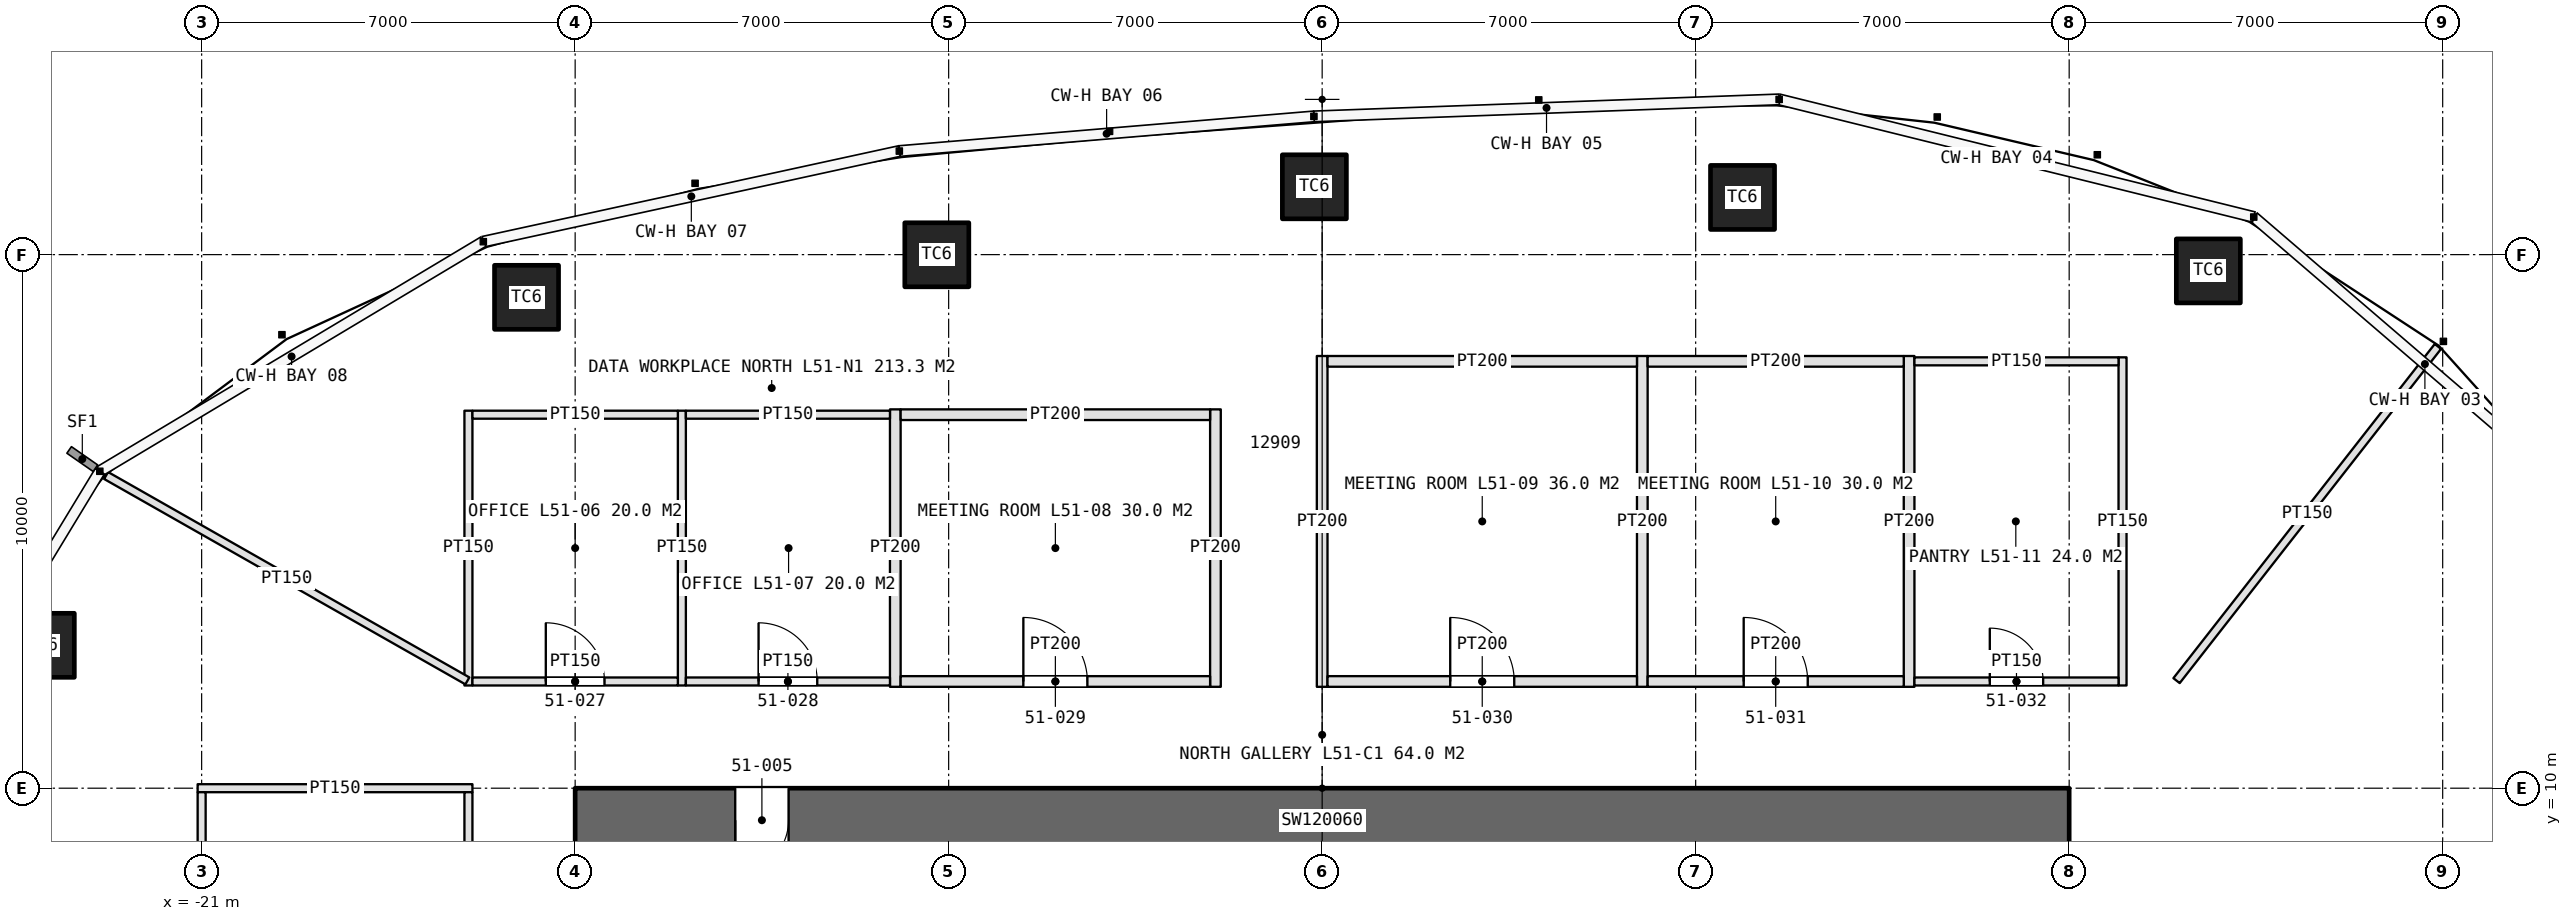
"""IFC4 building model, lengths in metres.
Left out: names, types, materials, properties, quantities, classifications, styles, units other than length and angle.
Written with IfcOpenShell. Run it as: python <this file> out.ifc"""

import sys

from ifc_helpers import new_model, si_unit, direction, frame, frame_2d, origin, origin_2d, place, context, subcontext, project, spatial, rectangle, extrude, element, fill, save


model = new_model("IFC4")
c1 = context("Model", 3, precision=1e-05, world=origin(), true_north=direction((0.0, 1.0)))
c2 = subcontext(c1, "Body", "Model", "MODEL_VIEW")
j1 = project(units=[si_unit("LENGTHUNIT", "METRE"), si_unit("PLANEANGLEUNIT", "RADIAN")], contexts=[c1])
p1 = place(None, origin())
s1 = spatial("IfcSite", under=j1, at=p1, CompositionType="ELEMENT")
p2 = place(p1, origin())
s2 = spatial("IfcBuilding", under=s1, at=p2, CompositionType="ELEMENT")
p3 = place(p2, frame((0.0, 0.0, 232.6)))
s3 = spatial("IfcBuildingStorey", under=s2, at=p3, CompositionType="ELEMENT", Elevation=232.6)
p4 = place(p3, frame((14.0, 9.4, 0.0), z_axis=(0.0, 0.0, 1.0), x_axis=(-1.0, 0.0, 0.0)))
e1 = element("IfcWall", 1, at=p4, inside=s3, PredefinedType="SHEAR", context=c2, shape_type="SweptSolid", body=[
    extrude(rectangle(XDim=28.0, YDim=1.2, at=frame_2d((14.0, 0.0))), origin(), (0.0, 0.0, 1.0), 4.2),
])
p5 = place(p4, frame((24.0, 0.0, 0.0)))
e2 = element("IfcOpeningElement", 2, at=p5, cuts=e1, PredefinedType="OPENING", context=c2, shape_type="SweptSolid", body=[
    extrude(rectangle(XDim=1.0, YDim=2.4, at=frame_2d((0.5, 1.2))), frame((0.0, 0.61, 0.0), z_axis=(0.0, -1.0, 0.0), x_axis=(1.0, 0.0, 0.0)), (0.0, 0.0, 1.0), 1.22),
])
for number, where, z_axis, x_axis in (
    (3, (16.608, 19.695, 0.0), (0.0, 0.0, 1.0), (1.0, 0.0, 0.0)),
    (4, (7.878, 21.072, 0.0), (0.0, 0.0, 1.0), (1.0, 0.0, 0.0)),
    (5, (-0.146, 21.271, 0.0), (0.0, 0.0, 1.0), (1.0, 0.0, 0.0)),
    (6, (-7.222, 19.997, 0.0), (0.0, 0.0, 1.0), (1.0, 0.0, 0.0)),
    (7, (-14.911, 19.2, 0.0), (0.0, 0.0, 1.0), (1.0, 0.0, 0.0)),
    (8, (-23.986, 12.678, 0.0), (0.0, 0.0, 1.0), (1.0, 0.0, 0.0)),
):
    element("IfcColumn", number, at=place(p3, frame(where, z_axis=z_axis, x_axis=x_axis)), inside=s3, PredefinedType="COLUMN", context=c2, shape_type="SweptSolid", body=[
        extrude(rectangle(XDim=1.2, YDim=1.2, at=origin_2d()), origin(), (0.0, 0.0, 1.0), 4.2),
    ])
for number, where, z_axis, x_axis in (
    (9, (-16.0, 11.925, 0.0), (0.0, 0.0, 1.0), (0.0, 1.0, 0.0)),
    (10, (-12.0, 11.925, 0.0), (0.0, 0.0, 1.0), (0.0, 1.0, 0.0)),
):
    element("IfcWall", number, at=place(p3, frame(where, z_axis=z_axis, x_axis=x_axis)), inside=s3, PredefinedType="PARTITIONING", context=c2, shape_type="SweptSolid", body=[
        extrude(rectangle(XDim=5.15, YDim=0.15, at=frame_2d((2.575, 0.0))), origin(), (0.0, 0.0, 1.0), 3.0),
    ])
for number, where, z_axis, x_axis in (
    (11, (-8.0, 11.9, 0.0), (0.0, 0.0, 1.0), (0.0, 1.0, 0.0)),
    (12, (-2.0, 11.9, 0.0), (0.0, 0.0, 1.0), (0.0, 1.0, 0.0)),
):
    element("IfcWall", number, at=place(p3, frame(where, z_axis=z_axis, x_axis=x_axis)), inside=s3, PredefinedType="PARTITIONING", context=c2, shape_type="SweptSolid", body=[
        extrude(rectangle(XDim=5.2, YDim=0.2, at=frame_2d((2.6, 0.0))), origin(), (0.0, 0.0, 1.0), 3.0),
    ])
p6 = place(p3, frame((-15.925, 12.0, 0.0), z_axis=(0.0, 0.0, 1.0), x_axis=(1.0, 0.0, 0.0)))
e13 = element("IfcWall", 13, at=p6, inside=s3, PredefinedType="PARTITIONING", context=c2, shape_type="SweptSolid", body=[
    extrude(rectangle(XDim=3.85, YDim=0.15, at=frame_2d((1.925, 0.0))), origin(), (0.0, 0.0, 1.0), 3.0),
])
p7 = place(p6, frame((1.375, 0.0, 0.0)))
e14 = element("IfcOpeningElement", 14, at=p7, cuts=e13, PredefinedType="OPENING", context=c2, shape_type="SweptSolid", body=[
    extrude(rectangle(XDim=1.1, YDim=2.3, at=frame_2d((0.55, 1.15))), frame((0.0, 0.085, 0.0), z_axis=(0.0, -1.0, 0.0), x_axis=(1.0, 0.0, 0.0)), (0.0, 0.0, 1.0), 0.17),
])
p8 = place(p3, frame((-15.925, 17.0, 0.0), z_axis=(0.0, 0.0, 1.0), x_axis=(1.0, 0.0, 0.0)))
e15 = element("IfcWall", 15, at=p8, inside=s3, PredefinedType="PARTITIONING", context=c2, shape_type="SweptSolid", body=[
    extrude(rectangle(XDim=3.85, YDim=0.15, at=frame_2d((1.925, 0.0))), origin(), (0.0, 0.0, 1.0), 3.0),
])
p9 = place(p3, frame((-11.925, 12.0, 0.0), z_axis=(0.0, 0.0, 1.0), x_axis=(1.0, 0.0, 0.0)))
e16 = element("IfcWall", 16, at=p9, inside=s3, PredefinedType="PARTITIONING", context=c2, shape_type="SweptSolid", body=[
    extrude(rectangle(XDim=3.825, YDim=0.15, at=frame_2d((1.913, 0.0))), origin(), (0.0, 0.0, 1.0), 3.0),
])
p10 = place(p9, frame((1.363, 0.0, 0.0)))
e17 = element("IfcOpeningElement", 17, at=p10, cuts=e16, PredefinedType="OPENING", context=c2, shape_type="SweptSolid", body=[
    extrude(rectangle(XDim=1.1, YDim=2.3, at=frame_2d((0.55, 1.15))), frame((0.0, 0.085, 0.0), z_axis=(0.0, -1.0, 0.0), x_axis=(1.0, 0.0, 0.0)), (0.0, 0.0, 1.0), 0.17),
])
p11 = place(p3, frame((-11.925, 17.0, 0.0), z_axis=(0.0, 0.0, 1.0), x_axis=(1.0, 0.0, 0.0)))
e18 = element("IfcWall", 18, at=p11, inside=s3, PredefinedType="PARTITIONING", context=c2, shape_type="SweptSolid", body=[
    extrude(rectangle(XDim=3.825, YDim=0.15, at=frame_2d((1.913, 0.0))), origin(), (0.0, 0.0, 1.0), 3.0),
])
p12 = place(p3, frame((-7.9, 12.0, 0.0), z_axis=(0.0, 0.0, 1.0), x_axis=(1.0, 0.0, 0.0)))
e19 = element("IfcWall", 19, at=p12, inside=s3, PredefinedType="PARTITIONING", context=c2, shape_type="SweptSolid", body=[
    extrude(rectangle(XDim=5.8, YDim=0.2, at=frame_2d((2.9, 0.0))), origin(), (0.0, 0.0, 1.0), 3.0),
])
p13 = place(p12, frame((2.3, 0.0, 0.0)))
e20 = element("IfcOpeningElement", 20, at=p13, cuts=e19, PredefinedType="OPENING", context=c2, shape_type="SweptSolid", body=[
    extrude(rectangle(XDim=1.2, YDim=2.4, at=frame_2d((0.6, 1.2))), frame((0.0, 0.11, 0.0), z_axis=(0.0, -1.0, 0.0), x_axis=(1.0, 0.0, 0.0)), (0.0, 0.0, 1.0), 0.22),
])
p14 = place(p3, frame((-7.9, 17.0, 0.0), z_axis=(0.0, 0.0, 1.0), x_axis=(1.0, 0.0, 0.0)))
e21 = element("IfcWall", 21, at=p14, inside=s3, PredefinedType="PARTITIONING", context=c2, shape_type="SweptSolid", body=[
    extrude(rectangle(XDim=5.8, YDim=0.2, at=frame_2d((2.9, 0.0))), origin(), (0.0, 0.0, 1.0), 3.0),
])
for number, where, z_axis, x_axis in (
    (22, (0.0, 11.9, 0.0), (0.0, 0.0, 1.0), (0.0, 1.0, 0.0)),
    (23, (6.0, 11.9, 0.0), (0.0, 0.0, 1.0), (0.0, 1.0, 0.0)),
    (24, (11.0, 11.9, 0.0), (0.0, 0.0, 1.0), (0.0, 1.0, 0.0)),
):
    element("IfcWall", number, at=place(p3, frame(where, z_axis=z_axis, x_axis=x_axis)), inside=s3, PredefinedType="PARTITIONING", context=c2, shape_type="SweptSolid", body=[
        extrude(rectangle(XDim=6.2, YDim=0.2, at=frame_2d((3.1, 0.0))), origin(), (0.0, 0.0, 1.0), 3.0),
    ])
p15 = place(p3, frame((15.0, 11.925, 0.0), z_axis=(0.0, 0.0, 1.0), x_axis=(0.0, 1.0, 0.0)))
e25 = element("IfcWall", 25, at=p15, inside=s3, PredefinedType="PARTITIONING", context=c2, shape_type="SweptSolid", body=[
    extrude(rectangle(XDim=6.15, YDim=0.15, at=frame_2d((3.075, 0.0))), origin(), (0.0, 0.0, 1.0), 3.0),
])
p16 = place(p3, frame((0.1, 12.0, 0.0), z_axis=(0.0, 0.0, 1.0), x_axis=(1.0, 0.0, 0.0)))
e26 = element("IfcWall", 26, at=p16, inside=s3, PredefinedType="PARTITIONING", context=c2, shape_type="SweptSolid", body=[
    extrude(rectangle(XDim=5.8, YDim=0.2, at=frame_2d((2.9, 0.0))), origin(), (0.0, 0.0, 1.0), 3.0),
])
p17 = place(p16, frame((2.3, 0.0, 0.0)))
e27 = element("IfcOpeningElement", 27, at=p17, cuts=e26, PredefinedType="OPENING", context=c2, shape_type="SweptSolid", body=[
    extrude(rectangle(XDim=1.2, YDim=2.4, at=frame_2d((0.6, 1.2))), frame((0.0, 0.11, 0.0), z_axis=(0.0, -1.0, 0.0), x_axis=(1.0, 0.0, 0.0)), (0.0, 0.0, 1.0), 0.22),
])
p18 = place(p3, frame((0.1, 18.0, 0.0), z_axis=(0.0, 0.0, 1.0), x_axis=(1.0, 0.0, 0.0)))
e28 = element("IfcWall", 28, at=p18, inside=s3, PredefinedType="PARTITIONING", context=c2, shape_type="SweptSolid", body=[
    extrude(rectangle(XDim=5.8, YDim=0.2, at=frame_2d((2.9, 0.0))), origin(), (0.0, 0.0, 1.0), 3.0),
])
p19 = place(p3, frame((6.1, 12.0, 0.0), z_axis=(0.0, 0.0, 1.0), x_axis=(1.0, 0.0, 0.0)))
e29 = element("IfcWall", 29, at=p19, inside=s3, PredefinedType="PARTITIONING", context=c2, shape_type="SweptSolid", body=[
    extrude(rectangle(XDim=4.8, YDim=0.2, at=frame_2d((2.4, 0.0))), origin(), (0.0, 0.0, 1.0), 3.0),
])
p20 = place(p19, frame((1.8, 0.0, 0.0)))
e30 = element("IfcOpeningElement", 30, at=p20, cuts=e29, PredefinedType="OPENING", context=c2, shape_type="SweptSolid", body=[
    extrude(rectangle(XDim=1.2, YDim=2.4, at=frame_2d((0.6, 1.2))), frame((0.0, 0.11, 0.0), z_axis=(0.0, -1.0, 0.0), x_axis=(1.0, 0.0, 0.0)), (0.0, 0.0, 1.0), 0.22),
])
p21 = place(p3, frame((6.1, 18.0, 0.0), z_axis=(0.0, 0.0, 1.0), x_axis=(1.0, 0.0, 0.0)))
e31 = element("IfcWall", 31, at=p21, inside=s3, PredefinedType="PARTITIONING", context=c2, shape_type="SweptSolid", body=[
    extrude(rectangle(XDim=4.8, YDim=0.2, at=frame_2d((2.4, 0.0))), origin(), (0.0, 0.0, 1.0), 3.0),
])
p22 = place(p3, frame((11.1, 12.0, 0.0), z_axis=(0.0, 0.0, 1.0), x_axis=(1.0, 0.0, 0.0)))
e32 = element("IfcWall", 32, at=p22, inside=s3, PredefinedType="PARTITIONING", context=c2, shape_type="SweptSolid", body=[
    extrude(rectangle(XDim=3.825, YDim=0.15, at=frame_2d((1.913, 0.0))), origin(), (0.0, 0.0, 1.0), 3.0),
])
p23 = place(p22, frame((1.413, 0.0, 0.0)))
e33 = element("IfcOpeningElement", 33, at=p23, cuts=e32, PredefinedType="OPENING", context=c2, shape_type="SweptSolid", body=[
    extrude(rectangle(XDim=1.0, YDim=2.2, at=frame_2d((0.5, 1.1))), frame((0.0, 0.085, 0.0), z_axis=(0.0, -1.0, 0.0), x_axis=(1.0, 0.0, 0.0)), (0.0, 0.0, 1.0), 0.17),
])
p24 = place(p3, frame((11.1, 18.0, 0.0), z_axis=(0.0, 0.0, 1.0), x_axis=(1.0, 0.0, 0.0)))
e34 = element("IfcWall", 34, at=p24, inside=s3, PredefinedType="PARTITIONING", context=c2, shape_type="SweptSolid", body=[
    extrude(rectangle(XDim=3.825, YDim=0.15, at=frame_2d((1.913, 0.0))), origin(), (0.0, 0.0, 1.0), 3.0),
])
p25 = place(p3, frame((-15.925, 10.0, 0.0), z_axis=(0.0, 0.0, 1.0), x_axis=(-1.0, 0.0, 0.0)))
e35 = element("IfcWall", 35, at=p25, inside=s3, PredefinedType="PARTITIONING", context=c2, shape_type="SweptSolid", body=[
    extrude(rectangle(XDim=5.15, YDim=0.15, at=frame_2d((2.575, 0.0))), origin(), (0.0, 0.0, 1.0), 3.0),
])
p26 = place(p3, frame((-16.0, 5.075, 0.0), z_axis=(0.0, 0.0, 1.0), x_axis=(0.0, 1.0, 0.0)))
e36 = element("IfcWall", 36, at=p26, inside=s3, PredefinedType="PARTITIONING", context=c2, shape_type="SweptSolid", body=[
    extrude(rectangle(XDim=4.85, YDim=0.15, at=frame_2d((2.425, 0.0))), origin(), (0.0, 0.0, 1.0), 3.0),
])
p27 = place(p26, frame((1.875, 0.0, 0.0)))
e37 = element("IfcOpeningElement", 37, at=p27, cuts=e36, PredefinedType="OPENING", context=c2, shape_type="SweptSolid", body=[
    extrude(rectangle(XDim=1.1, YDim=2.3, at=frame_2d((0.55, 1.15))), frame((0.0, 0.085, 0.0), z_axis=(0.0, -1.0, 0.0), x_axis=(1.0, 0.0, 0.0)), (0.0, 0.0, 1.0), 0.17),
])
p28 = place(p3, frame((-21.0, 5.075, 0.0), z_axis=(0.0, 0.0, 1.0), x_axis=(0.0, 1.0, 0.0)))
e38 = element("IfcWall", 38, at=p28, inside=s3, PredefinedType="PARTITIONING", context=c2, shape_type="SweptSolid", body=[
    extrude(rectangle(XDim=4.85, YDim=0.15, at=frame_2d((2.425, 0.0))), origin(), (0.0, 0.0, 1.0), 3.0),
])
p29 = place(p3, frame((-16.02, 12.011, 0.0), z_axis=(0.0, 0.0, 1.0), x_axis=(-0.869354026591, 0.494189818238, 0.0)))
e39 = element("IfcWall", 39, at=p29, inside=s3, PredefinedType="PARTITIONING", context=c2, shape_type="SweptSolid", body=[
    extrude(rectangle(XDim=7.788, YDim=0.15, at=frame_2d((3.894, 0.0))), origin(), (0.0, 0.0, 1.0), 3.0),
])
p30 = place(p3, frame((16.012, 12.016, 0.0), z_axis=(0.0, 0.0, 1.0), x_axis=(0.616030058222, 0.787722646219, 0.0)))
e40 = element("IfcWall", 40, at=p30, inside=s3, PredefinedType="PARTITIONING", context=c2, shape_type="SweptSolid", body=[
    extrude(rectangle(XDim=7.952, YDim=0.15, at=frame_2d((3.976, 0.0))), origin(), (0.0, 0.0, 1.0), 3.0),
])
p31 = place(p5, origin())
e41 = element("IfcDoor", 41, at=p31, inside=s3, OperationType="SINGLE_SWING_RIGHT", PredefinedType="DOOR", context=c2, shape_type="SweptSolid", body=[
    extrude(rectangle(XDim=1.0, YDim=2.4, at=frame_2d((0.5, 1.2))), frame((0.0, 0.025, 0.0), z_axis=(0.0, -1.0, 0.0), x_axis=(1.0, 0.0, 0.0)), (0.0, 0.0, 1.0), 0.05),
])
fill(e2, e41)
p32 = place(p7, origin())
e42 = element("IfcDoor", 42, at=p32, inside=s3, OperationType="SINGLE_SWING_LEFT", PredefinedType="DOOR", context=c2, shape_type="SweptSolid", body=[
    extrude(rectangle(XDim=1.1, YDim=2.3, at=frame_2d((0.55, 1.15))), frame((0.0, 0.025, 0.0), z_axis=(0.0, -1.0, 0.0), x_axis=(1.0, 0.0, 0.0)), (0.0, 0.0, 1.0), 0.05),
])
fill(e14, e42)
p33 = place(p10, origin())
e43 = element("IfcDoor", 43, at=p33, inside=s3, OperationType="SINGLE_SWING_LEFT", PredefinedType="DOOR", context=c2, shape_type="SweptSolid", body=[
    extrude(rectangle(XDim=1.1, YDim=2.3, at=frame_2d((0.55, 1.15))), frame((0.0, 0.025, 0.0), z_axis=(0.0, -1.0, 0.0), x_axis=(1.0, 0.0, 0.0)), (0.0, 0.0, 1.0), 0.05),
])
fill(e17, e43)
p34 = place(p13, origin())
e44 = element("IfcDoor", 44, at=p34, inside=s3, OperationType="SINGLE_SWING_LEFT", PredefinedType="DOOR", context=c2, shape_type="SweptSolid", body=[
    extrude(rectangle(XDim=1.2, YDim=2.4, at=frame_2d((0.6, 1.2))), frame((0.0, 0.025, 0.0), z_axis=(0.0, -1.0, 0.0), x_axis=(1.0, 0.0, 0.0)), (0.0, 0.0, 1.0), 0.05),
])
fill(e20, e44)
p35 = place(p17, origin())
e45 = element("IfcDoor", 45, at=p35, inside=s3, OperationType="SINGLE_SWING_LEFT", PredefinedType="DOOR", context=c2, shape_type="SweptSolid", body=[
    extrude(rectangle(XDim=1.2, YDim=2.4, at=frame_2d((0.6, 1.2))), frame((0.0, 0.025, 0.0), z_axis=(0.0, -1.0, 0.0), x_axis=(1.0, 0.0, 0.0)), (0.0, 0.0, 1.0), 0.05),
])
fill(e27, e45)
p36 = place(p20, origin())
e46 = element("IfcDoor", 46, at=p36, inside=s3, OperationType="SINGLE_SWING_LEFT", PredefinedType="DOOR", context=c2, shape_type="SweptSolid", body=[
    extrude(rectangle(XDim=1.2, YDim=2.4, at=frame_2d((0.6, 1.2))), frame((0.0, 0.025, 0.0), z_axis=(0.0, -1.0, 0.0), x_axis=(1.0, 0.0, 0.0)), (0.0, 0.0, 1.0), 0.05),
])
fill(e30, e46)
p37 = place(p23, origin())
e47 = element("IfcDoor", 47, at=p37, inside=s3, OperationType="SINGLE_SWING_LEFT", PredefinedType="DOOR", context=c2, shape_type="SweptSolid", body=[
    extrude(rectangle(XDim=1.0, YDim=2.2, at=frame_2d((0.5, 1.1))), frame((0.0, 0.025, 0.0), z_axis=(0.0, -1.0, 0.0), x_axis=(1.0, 0.0, 0.0)), (0.0, 0.0, 1.0), 0.05),
])
fill(e33, e47)
save(model, sys.argv[1])
